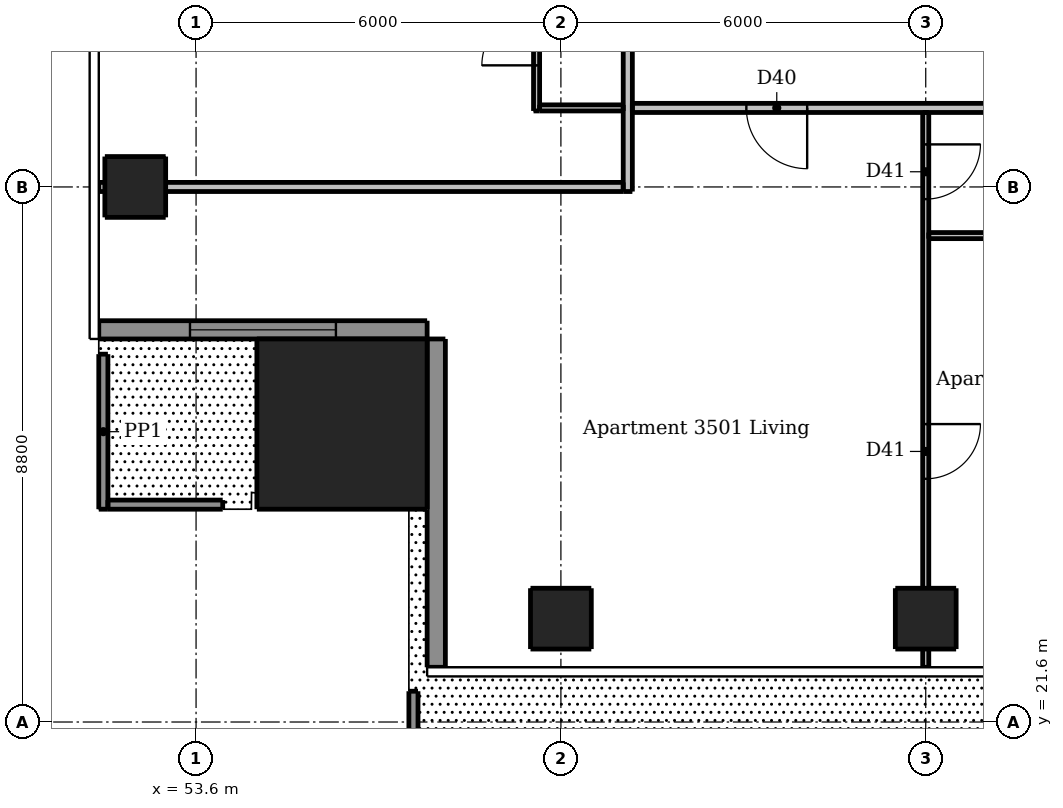
"""IFC4 building model, lengths in metres.
Left out: names, types, materials, properties, quantities, classifications, styles, units other than length and angle.
Written with IfcOpenShell. Run it as: python <this file> out.ifc"""

import sys

from ifc_helpers import new_model, si_unit, direction, frame, frame_2d, origin, origin_2d, place, context, subcontext, project, spatial, rectangle, extrude, element, fill, save


model = new_model("IFC4")
c1 = context("Model", 3, precision=1e-05, world=origin(), true_north=direction((0.0, 1.0)))
c2 = subcontext(c1, "Body", "Model", "MODEL_VIEW")
j1 = project(units=[si_unit("LENGTHUNIT", "METRE"), si_unit("PLANEANGLEUNIT", "RADIAN")], contexts=[c1])
p1 = place(None, origin())
s1 = spatial("IfcSite", under=j1, at=p1, CompositionType="ELEMENT")
p2 = place(p1, origin())
s2 = spatial("IfcBuilding", under=s1, at=p2, CompositionType="ELEMENT")
p3 = place(p2, frame((0.0, 0.0, 133.9)))
s3 = spatial("IfcBuildingStorey", under=s2, at=p3, CompositionType="ELEMENT", Elevation=133.9)
for number, where, z_axis, x_axis in (
    (1, (59.6, 23.3, 0.0), (0.0, 0.0, 1.0), (1.0, 0.0, 0.0)),
    (2, (65.6, 23.3, 0.0), (0.0, 0.0, 1.0), (1.0, 0.0, 0.0)),
    (3, (52.6, 30.4, 0.0), (0.0, 0.0, 1.0), (1.0, 0.0, 0.0)),
):
    element("IfcColumn", number, at=place(p3, frame(where, z_axis=z_axis, x_axis=x_axis)), inside=s3, PredefinedType="COLUMN", context=c2, shape_type="SweptSolid", body=[
        extrude(rectangle(XDim=1.0, YDim=1.0, at=origin_2d()), origin(), (0.0, 0.0, 1.0), 3.05),
    ])
p4 = place(p3, frame((56.0, 26.5, 0.0), z_axis=(0.0, 0.0, 1.0), x_axis=(1.0, 0.0, 0.0)))
e4 = element("IfcColumn", 4, at=p4, inside=s3, PredefinedType="COLUMN", context=c2, shape_type="SweptSolid", body=[
    extrude(rectangle(XDim=2.8, YDim=2.8, at=origin_2d()), origin(), (0.0, 0.0, 1.0), 3.3),
])
p5 = place(p3, frame((52.0, 28.05, 0.0), z_axis=(0.0, 0.0, 1.0), x_axis=(1.0, 0.0, 0.0)))
e5 = element("IfcWall", 5, at=p5, inside=s3, PredefinedType="SOLIDWALL", context=c2, shape_type="SweptSolid", body=[
    extrude(rectangle(XDim=5.4, YDim=0.3, at=frame_2d((2.7, 0.0))), origin(), (0.0, 0.0, 1.0), 3.05),
])
p6 = place(p5, frame((1.5, 0.0, 0.15)))
e6 = element("IfcOpeningElement", 6, at=p6, cuts=e5, PredefinedType="OPENING", context=c2, shape_type="SweptSolid", body=[
    extrude(rectangle(XDim=2.4, YDim=2.1, at=frame_2d((1.2, 1.05))), frame((0.0, 0.16, 0.0), z_axis=(0.0, -1.0, 0.0), x_axis=(1.0, 0.0, 0.0)), (0.0, 0.0, 1.0), 0.32),
])
p7 = place(p3, frame((57.55, 27.9, 0.0), z_axis=(0.0, 0.0, 1.0), x_axis=(0.0, -1.0, 0.0)))
e7 = element("IfcWall", 7, at=p7, inside=s3, PredefinedType="SOLIDWALL", context=c2, shape_type="SweptSolid", body=[
    extrude(rectangle(XDim=5.4, YDim=0.3, at=frame_2d((2.7, 0.0))), origin(), (0.0, 0.0, 1.0), 3.05),
])
p8 = place(p3, frame((52.075, 27.65, 0.0), z_axis=(0.0, 0.0, 1.0), x_axis=(0.0, -1.0, 0.0)))
e8 = element("IfcWall", 8, at=p8, inside=s3, PredefinedType="PARAPET", context=c2, shape_type="SweptSolid", body=[
    extrude(rectangle(XDim=2.55, YDim=0.15, at=frame_2d((1.275, 0.0))), origin(), (0.0, 0.0, 1.0), 1.1),
])
p9 = place(p3, frame((52.15, 25.175, 0.0), z_axis=(0.0, 0.0, 1.0), x_axis=(1.0, 0.0, 0.0)))
e9 = element("IfcWall", 9, at=p9, inside=s3, PredefinedType="PARAPET", context=c2, shape_type="SweptSolid", body=[
    extrude(rectangle(XDim=1.888, YDim=0.15, at=frame_2d((0.944, 0.0))), origin(), (0.0, 0.0, 1.0), 1.1),
])
p10 = place(p3, frame((57.175, 22.106, 0.0), z_axis=(0.0, 0.0, 1.0), x_axis=(0.0, -1.0, 0.0)))
e10 = element("IfcWall", 10, at=p10, inside=s3, PredefinedType="PARAPET", context=c2, shape_type="SweptSolid", body=[
    extrude(rectangle(XDim=2.106, YDim=0.15, at=frame_2d((1.053, 0.0))), origin(), (0.0, 0.0, 1.0), 1.1),
])
p11 = place(p3, frame((59.2, 31.65, 0.0), z_axis=(0.0, 0.0, 1.0), x_axis=(0.0, 1.0, 0.0)))
e11 = element("IfcWall", 11, at=p11, inside=s3, PredefinedType="PARTITIONING", context=c2, shape_type="SweptSolid", body=[
    extrude(rectangle(XDim=16.675, YDim=0.1, at=frame_2d((8.337, 0.0))), origin(), (0.0, 0.0, 1.0), 3.05),
])
p12 = place(p11, frame((0.75, 0.0, 0.0)))
e12 = element("IfcOpeningElement", 12, at=p12, cuts=e11, PredefinedType="OPENING", context=c2, shape_type="SweptSolid", body=[
    extrude(rectangle(XDim=0.9, YDim=2.1, at=frame_2d((0.45, 1.05))), frame((0.0, 0.06, 0.0), z_axis=(0.0, -1.0, 0.0), x_axis=(1.0, 0.0, 0.0)), (0.0, 0.0, 1.0), 0.12),
])
p13 = place(p11, frame((3.1, 0.0, 0.0)))
e13 = element("IfcOpeningElement", 13, at=p13, cuts=e11, PredefinedType="OPENING", context=c2, shape_type="SweptSolid", body=[
    extrude(rectangle(XDim=0.9, YDim=2.1, at=frame_2d((0.45, 1.05))), frame((0.0, 0.06, 0.0), z_axis=(0.0, -1.0, 0.0), x_axis=(1.0, 0.0, 0.0)), (0.0, 0.0, 1.0), 0.12),
])
p14 = place(p11, frame((8.5, 0.0, 0.0)))
e14 = element("IfcOpeningElement", 14, at=p14, cuts=e11, PredefinedType="OPENING", context=c2, shape_type="SweptSolid", body=[
    extrude(rectangle(XDim=0.9, YDim=2.1, at=frame_2d((0.45, 1.05))), frame((0.0, 0.06, 0.0), z_axis=(0.0, -1.0, 0.0), x_axis=(1.0, 0.0, 0.0)), (0.0, 0.0, 1.0), 0.12),
])
p15 = place(p11, frame((14.5, 0.0, 0.0)))
e15 = element("IfcOpeningElement", 15, at=p15, cuts=e11, PredefinedType="OPENING", context=c2, shape_type="SweptSolid", body=[
    extrude(rectangle(XDim=0.9, YDim=2.1, at=frame_2d((0.45, 1.05))), frame((0.0, 0.06, 0.0), z_axis=(0.0, -1.0, 0.0), x_axis=(1.0, 0.0, 0.0)), (0.0, 0.0, 1.0), 0.12),
])
p16 = place(p11, frame((5.55, 0.0, 0.0)))
e16 = element("IfcOpeningElement", 16, at=p16, cuts=e11, PredefinedType="OPENING", context=c2, shape_type="SweptSolid", body=[
    extrude(rectangle(XDim=0.8, YDim=2.1, at=frame_2d((0.4, 1.05))), frame((0.0, 0.06, 0.0), z_axis=(0.0, -1.0, 0.0), x_axis=(1.0, 0.0, 0.0)), (0.0, 0.0, 1.0), 0.12),
])
p17 = place(p11, frame((11.55, 0.0, 0.0)))
e17 = element("IfcOpeningElement", 17, at=p17, cuts=e11, PredefinedType="OPENING", context=c2, shape_type="SweptSolid", body=[
    extrude(rectangle(XDim=0.8, YDim=2.1, at=frame_2d((0.4, 1.05))), frame((0.0, 0.06, 0.0), z_axis=(0.0, -1.0, 0.0), x_axis=(1.0, 0.0, 0.0)), (0.0, 0.0, 1.0), 0.12),
])
p18 = place(p3, frame((65.6, 31.625, 0.0), z_axis=(0.0, 0.0, 1.0), x_axis=(0.0, -1.0, 0.0)))
e18 = element("IfcWall", 18, at=p18, inside=s3, PredefinedType="PARTITIONING", context=c2, shape_type="SweptSolid", body=[
    extrude(rectangle(XDim=9.125, YDim=0.1, at=frame_2d((4.562, 0.0))), origin(), (0.0, 0.0, 1.0), 2.516),
])
p19 = place(p18, frame((0.525, 0.0, 0.0)))
e19 = element("IfcOpeningElement", 19, at=p19, cuts=e18, PredefinedType="OPENING", context=c2, shape_type="SweptSolid", body=[
    extrude(rectangle(XDim=0.9, YDim=2.1, at=frame_2d((0.45, 1.05))), frame((0.0, 0.06, 0.0), z_axis=(0.0, -1.0, 0.0), x_axis=(1.0, 0.0, 0.0)), (0.0, 0.0, 1.0), 0.12),
])
p20 = place(p18, frame((5.125, 0.0, 0.0)))
e20 = element("IfcOpeningElement", 20, at=p20, cuts=e18, PredefinedType="OPENING", context=c2, shape_type="SweptSolid", body=[
    extrude(rectangle(XDim=0.9, YDim=2.1, at=frame_2d((0.45, 1.05))), frame((0.0, 0.06, 0.0), z_axis=(0.0, -1.0, 0.0), x_axis=(1.0, 0.0, 0.0)), (0.0, 0.0, 1.0), 0.12),
])
p21 = place(p3, frame((59.25, 31.7, 0.0), z_axis=(0.0, 0.0, 1.0), x_axis=(1.0, 0.0, 0.0)))
e21 = element("IfcWall", 21, at=p21, inside=s3, PredefinedType="PARTITIONING", context=c2, shape_type="SweptSolid", body=[
    extrude(rectangle(XDim=1.375, YDim=0.1, at=frame_2d((0.688, 0.0))), origin(), (0.0, 0.0, 1.0), 3.05),
])
p22 = place(p3, frame((65.65, 29.6, 0.0), z_axis=(0.0, 0.0, 1.0), x_axis=(1.0, 0.0, 0.0)))
e22 = element("IfcWall", 22, at=p22, inside=s3, PredefinedType="PARTITIONING", context=c2, shape_type="SweptSolid", body=[
    extrude(rectangle(XDim=5.875, YDim=0.1, at=frame_2d((2.938, 0.0))), origin(), (0.0, 0.0, 1.0), 3.05),
])
p23 = place(p22, frame((3.75, 0.0, 0.0)))
e23 = element("IfcOpeningElement", 23, at=p23, cuts=e22, PredefinedType="OPENING", context=c2, shape_type="SweptSolid", body=[
    extrude(rectangle(XDim=0.8, YDim=2.1, at=frame_2d((0.4, 1.05))), frame((0.0, 0.06, 0.0), z_axis=(0.0, -1.0, 0.0), x_axis=(1.0, 0.0, 0.0)), (0.0, 0.0, 1.0), 0.12),
])
p24 = place(p3, frame((60.7, 30.325, 0.0), z_axis=(0.0, 0.0, 1.0), x_axis=(0.0, 1.0, 0.0)))
e24 = element("IfcWall", 24, at=p24, inside=s3, PredefinedType="PARTITIONING", context=c2, shape_type="SweptSolid", body=[
    extrude(rectangle(XDim=28.9, YDim=0.15, at=frame_2d((14.45, 0.0))), origin(), (0.0, 0.0, 1.0), 3.05),
])
p25 = place(p24, frame((9.225, 0.0, 0.0)))
e25 = element("IfcOpeningElement", 25, at=p25, cuts=e24, PredefinedType="OPENING", context=c2, shape_type="SweptSolid", body=[
    extrude(rectangle(XDim=1.0, YDim=2.1, at=frame_2d((0.5, 1.05))), frame((0.0, 0.085, 0.0), z_axis=(0.0, -1.0, 0.0), x_axis=(1.0, 0.0, 0.0)), (0.0, 0.0, 1.0), 0.17),
])
p26 = place(p24, frame((26.025, 0.0, 0.0)))
e26 = element("IfcOpeningElement", 26, at=p26, cuts=e24, PredefinedType="OPENING", context=c2, shape_type="SweptSolid", body=[
    extrude(rectangle(XDim=1.0, YDim=2.1, at=frame_2d((0.5, 1.05))), frame((0.0, 0.085, 0.0), z_axis=(0.0, -1.0, 0.0), x_axis=(1.0, 0.0, 0.0)), (0.0, 0.0, 1.0), 0.17),
])
p27 = place(p3, frame((89.525, 31.7, 0.0), z_axis=(0.0, 0.0, 1.0), x_axis=(-1.0, 0.0, 0.0)))
e27 = element("IfcWall", 27, at=p27, inside=s3, PredefinedType="PARTITIONING", context=c2, shape_type="SweptSolid", body=[
    extrude(rectangle(XDim=28.75, YDim=0.15, at=frame_2d((14.375, 0.0))), origin(), (0.0, 0.0, 1.0), 3.05),
])
p28 = place(p27, frame((25.875, 0.0, 0.0)))
e28 = element("IfcOpeningElement", 28, at=p28, cuts=e27, PredefinedType="OPENING", context=c2, shape_type="SweptSolid", body=[
    extrude(rectangle(XDim=1.0, YDim=2.1, at=frame_2d((0.5, 1.05))), frame((0.0, 0.085, 0.0), z_axis=(0.0, -1.0, 0.0), x_axis=(1.0, 0.0, 0.0)), (0.0, 0.0, 1.0), 0.17),
])
p29 = place(p27, frame((9.075, 0.0, 0.0)))
e29 = element("IfcOpeningElement", 29, at=p29, cuts=e27, PredefinedType="OPENING", context=c2, shape_type="SweptSolid", body=[
    extrude(rectangle(XDim=1.0, YDim=2.1, at=frame_2d((0.5, 1.05))), frame((0.0, 0.085, 0.0), z_axis=(0.0, -1.0, 0.0), x_axis=(1.0, 0.0, 0.0)), (0.0, 0.0, 1.0), 0.17),
])
p30 = place(p3, frame((52.0, 30.4, 0.0), z_axis=(0.0, 0.0, 1.0), x_axis=(1.0, 0.0, 0.0)))
e30 = element("IfcWall", 30, at=p30, inside=s3, PredefinedType="PARTITIONING", context=c2, shape_type="SweptSolid", body=[
    extrude(rectangle(XDim=8.625, YDim=0.15, at=frame_2d((4.312, 0.0))), origin(), (0.0, 0.0, 1.0), 2.647),
])
p31 = place(p6, origin())
e31 = element("IfcWindow", 31, at=p31, inside=s3, PartitioningType="DOUBLE_PANEL_VERTICAL", PredefinedType="WINDOW", context=c2, shape_type="SweptSolid", body=[
    extrude(rectangle(XDim=2.4, YDim=2.1, at=frame_2d((1.2, 1.05))), frame((0.0, 0.03, 0.0), z_axis=(0.0, -1.0, 0.0), x_axis=(1.0, 0.0, 0.0)), (0.0, 0.0, 1.0), 0.06),
])
fill(e6, e31)
p32 = place(p28, origin())
e32 = element("IfcDoor", 32, at=p32, inside=s3, OperationType="SINGLE_SWING_LEFT", PredefinedType="DOOR", context=c2, shape_type="SweptSolid", body=[
    extrude(rectangle(XDim=1.0, YDim=2.1, at=frame_2d((0.5, 1.05))), frame((0.0, 0.025, 0.0), z_axis=(0.0, -1.0, 0.0), x_axis=(1.0, 0.0, 0.0)), (0.0, 0.0, 1.0), 0.05),
])
fill(e28, e32)
p33 = place(p19, origin())
e33 = element("IfcDoor", 33, at=p33, inside=s3, OperationType="SINGLE_SWING_LEFT", PredefinedType="DOOR", context=c2, shape_type="SweptSolid", body=[
    extrude(rectangle(XDim=0.9, YDim=2.1, at=frame_2d((0.45, 1.05))), frame((0.0, 0.025, 0.0), z_axis=(0.0, -1.0, 0.0), x_axis=(1.0, 0.0, 0.0)), (0.0, 0.0, 1.0), 0.05),
])
fill(e19, e33)
p34 = place(p20, origin())
e34 = element("IfcDoor", 34, at=p34, inside=s3, OperationType="SINGLE_SWING_LEFT", PredefinedType="DOOR", context=c2, shape_type="SweptSolid", body=[
    extrude(rectangle(XDim=0.9, YDim=2.1, at=frame_2d((0.45, 1.05))), frame((0.0, 0.025, 0.0), z_axis=(0.0, -1.0, 0.0), x_axis=(1.0, 0.0, 0.0)), (0.0, 0.0, 1.0), 0.05),
])
fill(e20, e34)
p35 = place(p12, origin())
e35 = element("IfcDoor", 35, at=p35, inside=s3, OperationType="SINGLE_SWING_LEFT", PredefinedType="DOOR", context=c2, shape_type="SweptSolid", body=[
    extrude(rectangle(XDim=0.9, YDim=2.1, at=frame_2d((0.45, 1.05))), frame((0.0, 0.025, 0.0), z_axis=(0.0, -1.0, 0.0), x_axis=(1.0, 0.0, 0.0)), (0.0, 0.0, 1.0), 0.05),
])
fill(e12, e35)
save(model, sys.argv[1])
